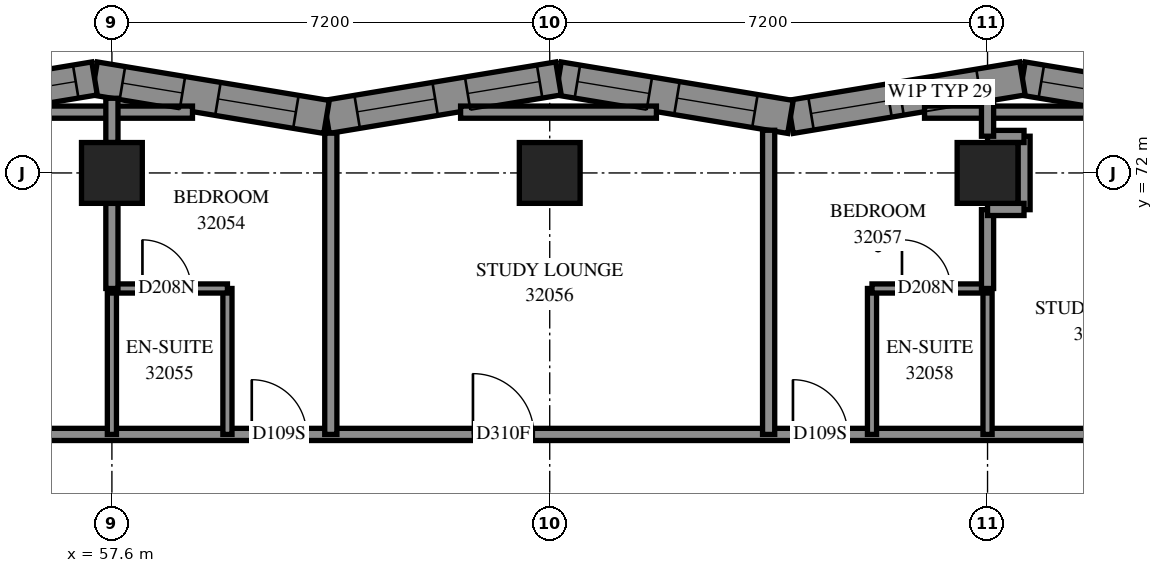
"""IFC4 building model, lengths in metres.
Left out: names, types, materials, properties, quantities, classifications, styles, units other than length and angle.
Written with IfcOpenShell. Run it as: python <this file> out.ifc"""

import sys

from ifc_helpers import new_model, si_unit, direction, frame, frame_2d, origin, origin_2d, place, context, subcontext, project, spatial, polyline, rectangle, outline, extrude, element, fill, save


model = new_model("IFC4")
c1 = context("Model", 3, precision=1e-05, world=origin(), true_north=direction((0.0, 1.0)))
c2 = subcontext(c1, "Body", "Model", "MODEL_VIEW")
j1 = project(units=[si_unit("LENGTHUNIT", "METRE"), si_unit("PLANEANGLEUNIT", "RADIAN")], contexts=[c1])
p1 = place(None, origin())
s1 = spatial("IfcSite", under=j1, at=p1, CompositionType="ELEMENT")
p2 = place(p1, origin())
s2 = spatial("IfcBuilding", under=s1, at=p2, CompositionType="ELEMENT")
p3 = place(p2, frame((0.0, 0.0, 118.6)))
s3 = spatial("IfcBuildingStorey", under=s2, at=p3, CompositionType="ELEMENT", Elevation=118.6)
for number, where, z_axis, x_axis in (
    (1, (57.6, 72.0, 0.0), (0.0, 0.0, 1.0), (1.0, 0.0, 0.0)),
    (2, (64.8, 72.0, 0.0), (0.0, 0.0, 1.0), (1.0, 0.0, 0.0)),
    (3, (72.0, 72.0, 0.0), (0.0, 0.0, 1.0), (1.0, 0.0, 0.0)),
):
    element("IfcColumn", number, at=place(p3, frame(where, z_axis=z_axis, x_axis=x_axis)), inside=s3, PredefinedType="COLUMN", context=c2, shape_type="SweptSolid", body=[
        extrude(rectangle(XDim=1.0, YDim=1.0, at=origin_2d()), origin(), (0.0, 0.0, 1.0), 3.1),
    ])
p4 = place(p3, frame((76.41, 72.918, 0.0), z_axis=(0.0, 0.0, 1.0), x_axis=(-0.9865139149, 0.1636774136, 0.0)))
e4 = element("IfcWall", 4, at=p4, inside=s3, PredefinedType="SOLIDWALL", context=c2, shape_type="SweptSolid", body=[
    extrude(outline(polyline([(0.067, -0.275), (3.934, -0.275), (3.843, 0.275), (-0.067, 0.275), (0.067, -0.275)])), origin(), (0.0, 0.0, 1.0), 3.1),
])
p5 = place(p4, frame((0.879, 0.0, 0.45)))
e5 = element("IfcOpeningElement", 5, at=p5, cuts=e4, PredefinedType="OPENING", context=c2, shape_type="SweptSolid", body=[
    extrude(rectangle(XDim=1.0, YDim=2.5, at=frame_2d((0.5, 1.25))), frame((0.0, 0.285, 0.0), z_axis=(0.0, -1.0, 0.0), x_axis=(1.0, 0.0, 0.0)), (0.0, 0.0, 1.0), 0.57),
])
p6 = place(p4, frame((2.374, 0.0, 0.5)))
e6 = element("IfcOpeningElement", 6, at=p6, cuts=e4, PredefinedType="OPENING", context=c2, shape_type="SweptSolid", body=[
    extrude(rectangle(XDim=1.2, YDim=2.45, at=frame_2d((0.6, 1.225))), frame((0.0, 0.285, 0.0), z_axis=(0.0, -1.0, 0.0), x_axis=(1.0, 0.0, 0.0)), (0.0, 0.0, 1.0), 0.57),
])
p7 = place(p3, frame((72.574, 73.554, 0.0), z_axis=(0.0, 0.0, 1.0), x_axis=(-0.9865110911, -0.1636944324, 0.0)))
e7 = element("IfcWall", 7, at=p7, inside=s3, PredefinedType="SOLIDWALL", context=c2, shape_type="SweptSolid", body=[
    extrude(outline(polyline([(-0.046, -0.275), (3.821, -0.275), (3.913, 0.275), (0.046, 0.275), (-0.046, -0.275)])), origin(), (0.0, 0.0, 1.0), 3.1),
])
p8 = place(p7, frame((0.724, 0.0, 0.5)))
e8 = element("IfcOpeningElement", 8, at=p8, cuts=e7, PredefinedType="OPENING", context=c2, shape_type="SweptSolid", body=[
    extrude(rectangle(XDim=1.3, YDim=2.45, at=frame_2d((0.65, 1.225))), frame((0.0, 0.285, 0.0), z_axis=(0.0, -1.0, 0.0), x_axis=(1.0, 0.0, 0.0)), (0.0, 0.0, 1.0), 0.57),
])
p9 = place(p7, frame((2.224, 0.0, 0.5)))
e9 = element("IfcOpeningElement", 9, at=p9, cuts=e7, PredefinedType="OPENING", context=c2, shape_type="SweptSolid", body=[
    extrude(rectangle(XDim=1.3, YDim=2.45, at=frame_2d((0.65, 1.225))), frame((0.0, 0.285, 0.0), z_axis=(0.0, -1.0, 0.0), x_axis=(1.0, 0.0, 0.0)), (0.0, 0.0, 1.0), 0.57),
])
p10 = place(p3, frame((68.759, 72.921, 0.0), z_axis=(0.0, 0.0, 1.0), x_axis=(-0.9865110911, 0.1636944324, 0.0)))
e10 = element("IfcWall", 10, at=p10, inside=s3, PredefinedType="SOLIDWALL", context=c2, shape_type="SweptSolid", body=[
    extrude(outline(polyline([(0.046, -0.275), (3.913, -0.275), (3.821, 0.275), (-0.046, 0.275), (0.046, -0.275)])), origin(), (0.0, 0.0, 1.0), 3.1),
])
p11 = place(p10, frame((0.593, 0.0, 0.5)))
e11 = element("IfcOpeningElement", 11, at=p11, cuts=e10, PredefinedType="OPENING", context=c2, shape_type="SweptSolid", body=[
    extrude(rectangle(XDim=1.3, YDim=2.45, at=frame_2d((0.65, 1.225))), frame((0.0, 0.285, 0.0), z_axis=(0.0, -1.0, 0.0), x_axis=(1.0, 0.0, 0.0)), (0.0, 0.0, 1.0), 0.57),
])
p12 = place(p10, frame((2.353, 0.0, 0.5)))
e12 = element("IfcOpeningElement", 12, at=p12, cuts=e10, PredefinedType="OPENING", context=c2, shape_type="SweptSolid", body=[
    extrude(rectangle(XDim=1.2, YDim=2.45, at=frame_2d((0.6, 1.225))), frame((0.0, 0.285, 0.0), z_axis=(0.0, -1.0, 0.0), x_axis=(1.0, 0.0, 0.0)), (0.0, 0.0, 1.0), 0.57),
])
p13 = place(p3, frame((64.944, 73.554, 0.0), z_axis=(0.0, 0.0, 1.0), x_axis=(-0.9865103981, -0.1636986085, 0.0)))
e13 = element("IfcWall", 13, at=p13, inside=s3, PredefinedType="SOLIDWALL", context=c2, shape_type="SweptSolid", body=[
    extrude(outline(polyline([(-0.046, -0.275), (3.821, -0.275), (3.913, 0.275), (0.046, 0.275), (-0.046, -0.275)])), origin(), (0.0, 0.0, 1.0), 3.1),
])
p14 = place(p13, frame((2.056, 0.0, 0.5)))
e14 = element("IfcOpeningElement", 14, at=p14, cuts=e13, PredefinedType="OPENING", context=c2, shape_type="SweptSolid", body=[
    extrude(rectangle(XDim=1.3, YDim=2.45, at=frame_2d((0.65, 1.225))), frame((0.0, 0.285, 0.0), z_axis=(0.0, -1.0, 0.0), x_axis=(1.0, 0.0, 0.0)), (0.0, 0.0, 1.0), 0.57),
])
p15 = place(p13, frame((0.315, 0.0, 0.5)))
e15 = element("IfcOpeningElement", 15, at=p15, cuts=e13, PredefinedType="OPENING", context=c2, shape_type="SweptSolid", body=[
    extrude(rectangle(XDim=1.2, YDim=2.45, at=frame_2d((0.6, 1.225))), frame((0.0, 0.285, 0.0), z_axis=(0.0, -1.0, 0.0), x_axis=(1.0, 0.0, 0.0)), (0.0, 0.0, 1.0), 0.57),
])
p16 = place(p3, frame((61.13, 72.921, 0.0), z_axis=(0.0, 0.0, 1.0), x_axis=(-0.9865110911, 0.1636944324, 0.0)))
e16 = element("IfcWall", 16, at=p16, inside=s3, PredefinedType="SOLIDWALL", context=c2, shape_type="SweptSolid", body=[
    extrude(outline(polyline([(0.046, -0.275), (3.913, -0.275), (3.821, 0.275), (-0.046, 0.275), (0.046, -0.275)])), origin(), (0.0, 0.0, 1.0), 3.1),
])
p17 = place(p16, frame((0.511, 0.0, 0.5)))
e17 = element("IfcOpeningElement", 17, at=p17, cuts=e16, PredefinedType="OPENING", context=c2, shape_type="SweptSolid", body=[
    extrude(rectangle(XDim=1.3, YDim=2.45, at=frame_2d((0.65, 1.225))), frame((0.0, 0.285, 0.0), z_axis=(0.0, -1.0, 0.0), x_axis=(1.0, 0.0, 0.0)), (0.0, 0.0, 1.0), 0.57),
])
p18 = place(p16, frame((2.402, 0.0, 0.45)))
e18 = element("IfcOpeningElement", 18, at=p18, cuts=e16, PredefinedType="OPENING", context=c2, shape_type="SweptSolid", body=[
    extrude(rectangle(XDim=1.0, YDim=2.5, at=frame_2d((0.5, 1.25))), frame((0.0, 0.285, 0.0), z_axis=(0.0, -1.0, 0.0), x_axis=(1.0, 0.0, 0.0)), (0.0, 0.0, 1.0), 0.57),
])
p19 = place(p3, frame((57.315, 73.554, 0.0), z_axis=(0.0, 0.0, 1.0), x_axis=(-0.9865110911, -0.1636944324, 0.0)))
e19 = element("IfcWall", 19, at=p19, inside=s3, PredefinedType="SOLIDWALL", context=c2, shape_type="SweptSolid", body=[
    extrude(outline(polyline([(-0.046, -0.275), (3.821, -0.275), (3.913, 0.275), (0.046, 0.275), (-0.046, -0.275)])), origin(), (0.0, 0.0, 1.0), 3.1),
])
p20 = place(p19, frame((1.903, 0.0, 0.5)))
e20 = element("IfcOpeningElement", 20, at=p20, cuts=e19, PredefinedType="OPENING", context=c2, shape_type="SweptSolid", body=[
    extrude(rectangle(XDim=1.3, YDim=2.45, at=frame_2d((0.65, 1.225))), frame((0.0, 0.285, 0.0), z_axis=(0.0, -1.0, 0.0), x_axis=(1.0, 0.0, 0.0)), (0.0, 0.0, 1.0), 0.57),
])
p21 = place(p19, frame((0.315, 0.0, 0.5)))
e21 = element("IfcOpeningElement", 21, at=p21, cuts=e19, PredefinedType="OPENING", context=c2, shape_type="SweptSolid", body=[
    extrude(rectangle(XDim=1.2, YDim=2.45, at=frame_2d((0.6, 1.225))), frame((0.0, 0.285, 0.0), z_axis=(0.0, -1.0, 0.0), x_axis=(1.0, 0.0, 0.0)), (0.0, 0.0, 1.0), 0.57),
])
p22 = place(p3, frame((54.7, 67.7, 0.0), z_axis=(0.0, 0.0, 1.0), x_axis=(1.0, 0.0, 0.0)))
e22 = element("IfcWall", 22, at=p22, inside=s3, PredefinedType="PARTITIONING", context=c2, shape_type="SweptSolid", body=[
    extrude(rectangle(XDim=20.2, YDim=0.2, at=frame_2d((10.1, 0.0))), origin(), (0.0, 0.0, 1.0), 3.1),
])
p23 = place(p22, frame((5.2, 0.0, 0.0)))
e23 = element("IfcOpeningElement", 23, at=p23, cuts=e22, PredefinedType="OPENING", context=c2, shape_type="SweptSolid", body=[
    extrude(rectangle(XDim=0.9, YDim=2.1, at=frame_2d((0.45, 1.05))), frame((0.0, 0.11, 0.0), z_axis=(0.0, -1.0, 0.0), x_axis=(1.0, 0.0, 0.0)), (0.0, 0.0, 1.0), 0.22),
])
p24 = place(p22, frame((8.838, 0.0, 0.0)))
e24 = element("IfcOpeningElement", 24, at=p24, cuts=e22, PredefinedType="OPENING", context=c2, shape_type="SweptSolid", body=[
    extrude(rectangle(XDim=1.0, YDim=2.1, at=frame_2d((0.5, 1.05))), frame((0.0, 0.11, 0.0), z_axis=(0.0, -1.0, 0.0), x_axis=(1.0, 0.0, 0.0)), (0.0, 0.0, 1.0), 0.22),
])
p25 = place(p22, frame((14.1, 0.0, 0.0)))
e25 = element("IfcOpeningElement", 25, at=p25, cuts=e22, PredefinedType="OPENING", context=c2, shape_type="SweptSolid", body=[
    extrude(rectangle(XDim=0.9, YDim=2.1, at=frame_2d((0.45, 1.05))), frame((0.0, 0.11, 0.0), z_axis=(0.0, -1.0, 0.0), x_axis=(1.0, 0.0, 0.0)), (0.0, 0.0, 1.0), 0.22),
])
p26 = place(p3, frame((68.4, 67.7, 0.0), z_axis=(0.0, 0.0, 1.0), x_axis=(0.0, 1.0, 0.0)))
e26 = element("IfcWall", 26, at=p26, inside=s3, PredefinedType="PARTITIONING", context=c2, shape_type="SweptSolid", body=[
    extrude(rectangle(XDim=5.002, YDim=0.2, at=frame_2d((2.501, 0.0))), origin(), (0.0, 0.0, 1.0), 3.1),
])
p27 = place(p3, frame((61.2, 67.7, 0.0), z_axis=(0.0, 0.0, 1.0), x_axis=(0.0, 1.0, 0.0)))
e27 = element("IfcWall", 27, at=p27, inside=s3, PredefinedType="PARTITIONING", context=c2, shape_type="SweptSolid", body=[
    extrude(rectangle(XDim=4.954, YDim=0.2, at=frame_2d((2.477, 0.0))), origin(), (0.0, 0.0, 1.0), 3.1),
])
p28 = place(p3, frame((70.964, 73.0, 0.0), z_axis=(0.0, 0.0, 1.0), x_axis=(1.0, 0.0, 0.0)))
e28 = element("IfcWall", 28, at=p28, inside=s3, PredefinedType="PARTITIONING", context=c2, shape_type="SweptSolid", body=[
    extrude(rectangle(XDim=3.22, YDim=0.2, at=frame_2d((1.61, 0.0))), origin(), (0.0, 0.0, 1.0), 3.1),
])
for number, where, z_axis, x_axis in (
    (29, (55.705, 73.0, 0.0), (0.0, 0.0, 1.0), (1.0, 0.0, 0.0)),
    (30, (63.334, 73.0, 0.0), (0.0, 0.0, 1.0), (1.0, 0.0, 0.0)),
):
    element("IfcWall", number, at=place(p3, frame(where, z_axis=z_axis, x_axis=x_axis)), inside=s3, PredefinedType="PARTITIONING", context=c2, shape_type="SweptSolid", body=[
        extrude(rectangle(XDim=3.22, YDim=0.2, at=frame_2d((1.61, 0.0))), origin(), (0.0, 0.0, 1.0), 3.1),
    ])
for number, where, z_axis, x_axis in (
    (31, (59.5, 67.7, 0.0), (0.0, 0.0, 1.0), (0.0, 1.0, 0.0)),
    (32, (57.6, 67.7, 0.0), (0.0, 0.0, 1.0), (0.0, 1.0, 0.0)),
    (33, (70.1, 67.7, 0.0), (0.0, 0.0, 1.0), (0.0, 1.0, 0.0)),
    (34, (72.0, 67.7, 0.0), (0.0, 0.0, 1.0), (0.0, 1.0, 0.0)),
):
    element("IfcWall", number, at=place(p3, frame(where, z_axis=z_axis, x_axis=x_axis)), inside=s3, PredefinedType="PARTITIONING", context=c2, shape_type="SweptSolid", body=[
        extrude(rectangle(XDim=2.4, YDim=0.15, at=frame_2d((1.2, 0.0))), origin(), (0.0, 0.0, 1.0), 3.1),
    ])
p29 = place(p3, frame((70.1, 70.1, 0.0), z_axis=(0.0, 0.0, 1.0), x_axis=(1.0, 0.0, 0.0)))
e35 = element("IfcWall", 35, at=p29, inside=s3, PredefinedType="PARTITIONING", context=c2, shape_type="SweptSolid", body=[
    extrude(rectangle(XDim=1.9, YDim=0.15, at=frame_2d((0.95, 0.0))), origin(), (0.0, 0.0, 1.0), 3.1),
])
p30 = place(p29, frame((0.493, 0.0, 0.0)))
e36 = element("IfcOpeningElement", 36, at=p30, cuts=e35, PredefinedType="OPENING", context=c2, shape_type="SweptSolid", body=[
    extrude(rectangle(XDim=0.8, YDim=2.1, at=frame_2d((0.4, 1.05))), frame((0.0, 0.085, 0.0), z_axis=(0.0, -1.0, 0.0), x_axis=(1.0, 0.0, 0.0)), (0.0, 0.0, 1.0), 0.17),
])
p31 = place(p3, frame((57.6, 70.1, 0.0), z_axis=(0.0, 0.0, 1.0), x_axis=(1.0, 0.0, 0.0)))
e37 = element("IfcWall", 37, at=p31, inside=s3, PredefinedType="PARTITIONING", context=c2, shape_type="SweptSolid", body=[
    extrude(rectangle(XDim=1.9, YDim=0.15, at=frame_2d((0.95, 0.0))), origin(), (0.0, 0.0, 1.0), 3.1),
])
p32 = place(p31, frame((0.502, 0.0, 0.0)))
e38 = element("IfcOpeningElement", 38, at=p32, cuts=e37, PredefinedType="OPENING", context=c2, shape_type="SweptSolid", body=[
    extrude(rectangle(XDim=0.8, YDim=2.1, at=frame_2d((0.4, 1.05))), frame((0.0, 0.085, 0.0), z_axis=(0.0, -1.0, 0.0), x_axis=(1.0, 0.0, 0.0)), (0.0, 0.0, 1.0), 0.17),
])
p33 = place(p3, frame((57.6, 70.1, 0.0), z_axis=(0.0, 0.0, 1.0), x_axis=(0.0, 1.0, 0.0)))
e39 = element("IfcWall", 39, at=p33, inside=s3, PredefinedType="PARTITIONING", context=c2, shape_type="SweptSolid", body=[
    extrude(rectangle(XDim=1.4, YDim=0.2, at=frame_2d((0.7, 0.0))), origin(), (0.0, 0.0, 1.0), 3.1),
])
p34 = place(p3, frame((72.0, 70.1, 0.0), z_axis=(0.0, 0.0, 1.0), x_axis=(0.0, 1.0, 0.0)))
e40 = element("IfcWall", 40, at=p34, inside=s3, PredefinedType="PARTITIONING", context=c2, shape_type="SweptSolid", body=[
    extrude(rectangle(XDim=1.296, YDim=0.2, at=frame_2d((0.648, 0.0))), origin(), (0.0, 0.0, 1.0), 3.1),
])
p35 = place(p3, frame((72.6, 71.396, 0.0), z_axis=(0.0, 0.0, 1.0), x_axis=(0.0, 1.0, 0.0)))
e41 = element("IfcWall", 41, at=p35, inside=s3, PredefinedType="PARTITIONING", context=c2, shape_type="SweptSolid", body=[
    extrude(rectangle(XDim=1.208, YDim=0.2, at=frame_2d((0.604, 0.0))), origin(), (0.0, 0.0, 1.0), 3.1),
])
for number, where, z_axis, x_axis in (
    (42, (72.0, 72.6, 0.0), (0.0, 0.0, 1.0), (1.0, 0.0, 0.0)),
    (43, (72.0, 71.4, 0.0), (0.0, 0.0, 1.0), (1.0, 0.0, 0.0)),
):
    element("IfcWall", number, at=place(p3, frame(where, z_axis=z_axis, x_axis=x_axis)), inside=s3, PredefinedType="PARTITIONING", context=c2, shape_type="SweptSolid", body=[
        extrude(rectangle(XDim=0.6, YDim=0.2, at=frame_2d((0.3, 0.0))), origin(), (0.0, 0.0, 1.0), 3.1),
    ])
p36 = place(p3, frame((57.6, 72.5, 0.0), z_axis=(0.0, 0.0, 1.0), x_axis=(0.0, 1.0, 0.0)))
e44 = element("IfcWall", 44, at=p36, inside=s3, PredefinedType="PARTITIONING", context=c2, shape_type="SweptSolid", body=[
    extrude(rectangle(XDim=0.728, YDim=0.2, at=frame_2d((0.364, 0.0))), origin(), (0.0, 0.0, 1.0), 3.1),
])
p37 = place(p3, frame((72.0, 72.604, 0.0), z_axis=(0.0, 0.0, 1.0), x_axis=(0.0, 1.0, 0.0)))
e45 = element("IfcWall", 45, at=p37, inside=s3, PredefinedType="PARTITIONING", context=c2, shape_type="SweptSolid", body=[
    extrude(rectangle(XDim=0.576, YDim=0.2, at=frame_2d((0.288, 0.0))), origin(), (0.0, 0.0, 1.0), 3.1),
])
p38 = place(p8, origin())
e46 = element("IfcWindow", 46, at=p38, inside=s3, PartitioningType="SINGLE_PANEL", PredefinedType="WINDOW", context=c2, shape_type="SweptSolid", body=[
    extrude(rectangle(XDim=1.3, YDim=2.45, at=frame_2d((0.65, 1.225))), frame((0.0, 0.155, 0.0), z_axis=(0.0, -1.0, 0.0), x_axis=(1.0, 0.0, 0.0)), (0.0, 0.0, 1.0), 0.06),
])
fill(e8, e46)
p39 = place(p9, origin())
e47 = element("IfcWindow", 47, at=p39, inside=s3, PartitioningType="SINGLE_PANEL", PredefinedType="WINDOW", context=c2, shape_type="SweptSolid", body=[
    extrude(rectangle(XDim=1.3, YDim=2.45, at=frame_2d((0.65, 1.225))), frame((0.0, 0.155, 0.0), z_axis=(0.0, -1.0, 0.0), x_axis=(1.0, 0.0, 0.0)), (0.0, 0.0, 1.0), 0.06),
])
fill(e9, e47)
p40 = place(p11, origin())
e48 = element("IfcWindow", 48, at=p40, inside=s3, PartitioningType="SINGLE_PANEL", PredefinedType="WINDOW", context=c2, shape_type="SweptSolid", body=[
    extrude(rectangle(XDim=1.3, YDim=2.45, at=frame_2d((0.65, 1.225))), frame((0.0, 0.155, 0.0), z_axis=(0.0, -1.0, 0.0), x_axis=(1.0, 0.0, 0.0)), (0.0, 0.0, 1.0), 0.06),
])
fill(e11, e48)
p41 = place(p14, origin())
e49 = element("IfcWindow", 49, at=p41, inside=s3, PartitioningType="SINGLE_PANEL", PredefinedType="WINDOW", context=c2, shape_type="SweptSolid", body=[
    extrude(rectangle(XDim=1.3, YDim=2.45, at=frame_2d((0.65, 1.225))), frame((0.0, 0.155, 0.0), z_axis=(0.0, -1.0, 0.0), x_axis=(1.0, 0.0, 0.0)), (0.0, 0.0, 1.0), 0.06),
])
fill(e14, e49)
p42 = place(p17, origin())
e50 = element("IfcWindow", 50, at=p42, inside=s3, PartitioningType="SINGLE_PANEL", PredefinedType="WINDOW", context=c2, shape_type="SweptSolid", body=[
    extrude(rectangle(XDim=1.3, YDim=2.45, at=frame_2d((0.65, 1.225))), frame((0.0, 0.155, 0.0), z_axis=(0.0, -1.0, 0.0), x_axis=(1.0, 0.0, 0.0)), (0.0, 0.0, 1.0), 0.06),
])
fill(e17, e50)
p43 = place(p23, origin())
e51 = element("IfcDoor", 51, at=p43, inside=s3, OperationType="SINGLE_SWING_RIGHT", PredefinedType="DOOR", context=c2, shape_type="SweptSolid", body=[
    extrude(rectangle(XDim=0.9, YDim=2.1, at=frame_2d((0.45, 1.05))), frame((0.0, 0.025, 0.0), z_axis=(0.0, -1.0, 0.0), x_axis=(1.0, 0.0, 0.0)), (0.0, 0.0, 1.0), 0.05),
])
fill(e23, e51)
p44 = place(p32, origin())
e52 = element("IfcDoor", 52, at=p44, inside=s3, OperationType="SINGLE_SWING_RIGHT", PredefinedType="DOOR", context=c2, shape_type="SweptSolid", body=[
    extrude(rectangle(XDim=0.8, YDim=2.1, at=frame_2d((0.4, 1.05))), frame((0.0, 0.025, 0.0), z_axis=(0.0, -1.0, 0.0), x_axis=(1.0, 0.0, 0.0)), (0.0, 0.0, 1.0), 0.05),
])
fill(e38, e52)
p45 = place(p24, origin())
e53 = element("IfcDoor", 53, at=p45, inside=s3, OperationType="SINGLE_SWING_LEFT", PredefinedType="DOOR", context=c2, shape_type="SweptSolid", body=[
    extrude(rectangle(XDim=1.0, YDim=2.1, at=frame_2d((0.5, 1.05))), frame((0.0, 0.025, 0.0), z_axis=(0.0, -1.0, 0.0), x_axis=(1.0, 0.0, 0.0)), (0.0, 0.0, 1.0), 0.05),
])
fill(e24, e53)
p46 = place(p25, origin())
e54 = element("IfcDoor", 54, at=p46, inside=s3, OperationType="SINGLE_SWING_LEFT", PredefinedType="DOOR", context=c2, shape_type="SweptSolid", body=[
    extrude(rectangle(XDim=0.9, YDim=2.1, at=frame_2d((0.45, 1.05))), frame((0.0, 0.025, 0.0), z_axis=(0.0, -1.0, 0.0), x_axis=(1.0, 0.0, 0.0)), (0.0, 0.0, 1.0), 0.05),
])
fill(e25, e54)
p47 = place(p30, origin())
e55 = element("IfcDoor", 55, at=p47, inside=s3, OperationType="SINGLE_SWING_RIGHT", PredefinedType="DOOR", context=c2, shape_type="SweptSolid", body=[
    extrude(rectangle(XDim=0.8, YDim=2.1, at=frame_2d((0.4, 1.05))), frame((0.0, 0.025, 0.0), z_axis=(0.0, -1.0, 0.0), x_axis=(1.0, 0.0, 0.0)), (0.0, 0.0, 1.0), 0.05),
])
fill(e36, e55)
p48 = place(p6, origin())
e56 = element("IfcWindow", 56, at=p48, inside=s3, PartitioningType="SINGLE_PANEL", PredefinedType="WINDOW", context=c2, shape_type="SweptSolid", body=[
    extrude(rectangle(XDim=1.2, YDim=2.45, at=frame_2d((0.6, 1.225))), frame((0.0, 0.155, 0.0), z_axis=(0.0, -1.0, 0.0), x_axis=(1.0, 0.0, 0.0)), (0.0, 0.0, 1.0), 0.06),
])
fill(e6, e56)
p49 = place(p12, origin())
e57 = element("IfcWindow", 57, at=p49, inside=s3, PartitioningType="SINGLE_PANEL", PredefinedType="WINDOW", context=c2, shape_type="SweptSolid", body=[
    extrude(rectangle(XDim=1.2, YDim=2.45, at=frame_2d((0.6, 1.225))), frame((0.0, 0.155, 0.0), z_axis=(0.0, -1.0, 0.0), x_axis=(1.0, 0.0, 0.0)), (0.0, 0.0, 1.0), 0.06),
])
fill(e12, e57)
p50 = place(p15, origin())
e58 = element("IfcWindow", 58, at=p50, inside=s3, PartitioningType="SINGLE_PANEL", PredefinedType="WINDOW", context=c2, shape_type="SweptSolid", body=[
    extrude(rectangle(XDim=1.2, YDim=2.45, at=frame_2d((0.6, 1.225))), frame((0.0, 0.155, 0.0), z_axis=(0.0, -1.0, 0.0), x_axis=(1.0, 0.0, 0.0)), (0.0, 0.0, 1.0), 0.06),
])
fill(e15, e58)
p51 = place(p18, origin())
e59 = element("IfcWindow", 59, at=p51, inside=s3, PartitioningType="SINGLE_PANEL", PredefinedType="WINDOW", context=c2, shape_type="SweptSolid", body=[
    extrude(rectangle(XDim=1.0, YDim=2.5, at=frame_2d((0.5, 1.25))), frame((0.0, 0.155, 0.0), z_axis=(0.0, -1.0, 0.0), x_axis=(1.0, 0.0, 0.0)), (0.0, 0.0, 1.0), 0.06),
])
fill(e18, e59)
p52 = place(p21, origin())
e60 = element("IfcWindow", 60, at=p52, inside=s3, PartitioningType="SINGLE_PANEL", PredefinedType="WINDOW", context=c2, shape_type="SweptSolid", body=[
    extrude(rectangle(XDim=1.2, YDim=2.45, at=frame_2d((0.6, 1.225))), frame((0.0, 0.155, 0.0), z_axis=(0.0, -1.0, 0.0), x_axis=(1.0, 0.0, 0.0)), (0.0, 0.0, 1.0), 0.06),
])
fill(e21, e60)
save(model, sys.argv[1])
